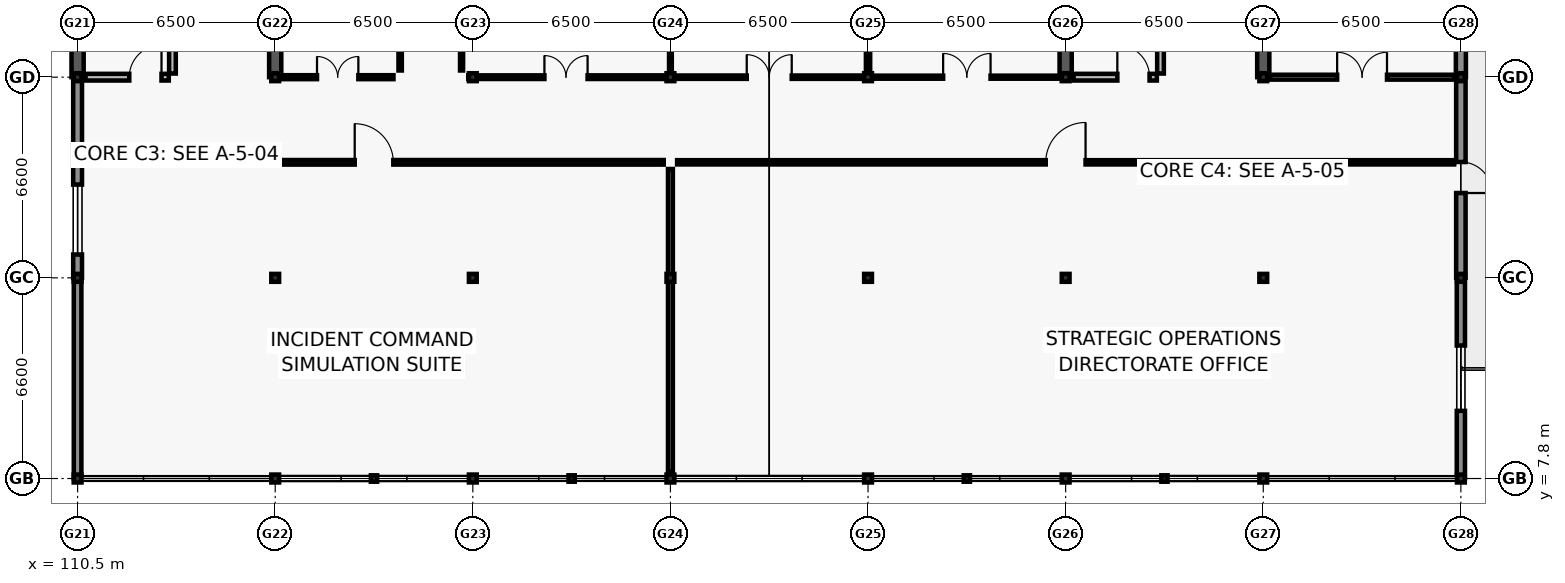
"""IFC4 building model, lengths in metres.
Left out: names, types, materials, properties, quantities, classifications, styles, units other than length and angle.
Written with IfcOpenShell. Run it as: python <this file> out.ifc"""

import sys

from ifc_helpers import new_model, si_unit, direction, frame, frame_2d, origin, origin_2d, place, context, subcontext, project, spatial, rectangle, i_section, extrude, element, fill, save


model = new_model("IFC4")
c1 = context("Model", 3, precision=1e-05, world=origin(), true_north=direction((0.0, 1.0)))
c2 = subcontext(c1, "Body", "Model", "MODEL_VIEW")
j1 = project(units=[si_unit("LENGTHUNIT", "METRE"), si_unit("PLANEANGLEUNIT", "RADIAN")], contexts=[c1])
p1 = place(None, origin())
s1 = spatial("IfcSite", under=j1, at=p1, CompositionType="ELEMENT")
p2 = place(p1, origin())
s2 = spatial("IfcBuilding", under=s1, at=p2, CompositionType="ELEMENT")
p3 = place(p2, frame((0.0, 0.0, 17.4)))
s3 = spatial("IfcBuildingStorey", under=s2, at=p3, CompositionType="ELEMENT", Elevation=17.4)
for number, where, z_axis, x_axis in (
    (1, (110.5, 7.8, 0.0), (0.0, 0.0, 1.0), (1.0, 0.0, 0.0)),
    (2, (110.5, 14.4, 0.0), (0.0, 0.0, 1.0), (1.0, 0.0, 0.0)),
    (3, (110.5, 21.0, 0.0), (0.0, 0.0, 1.0), (1.0, 0.0, 0.0)),
    (4, (117.0, 7.8, 0.0), (0.0, 0.0, 1.0), (1.0, 0.0, 0.0)),
    (5, (117.0, 14.4, 0.0), (0.0, 0.0, 1.0), (1.0, 0.0, 0.0)),
    (6, (117.0, 21.0, 0.0), (0.0, 0.0, 1.0), (1.0, 0.0, 0.0)),
    (7, (123.5, 7.8, 0.0), (0.0, 0.0, 1.0), (1.0, 0.0, 0.0)),
    (8, (123.5, 14.4, 0.0), (0.0, 0.0, 1.0), (1.0, 0.0, 0.0)),
    (9, (123.5, 21.0, 0.0), (0.0, 0.0, 1.0), (1.0, 0.0, 0.0)),
    (10, (130.0, 7.8, 0.0), (0.0, 0.0, 1.0), (1.0, 0.0, 0.0)),
    (11, (130.0, 14.4, 0.0), (0.0, 0.0, 1.0), (1.0, 0.0, 0.0)),
    (12, (130.0, 21.0, 0.0), (0.0, 0.0, 1.0), (1.0, 0.0, 0.0)),
    (13, (136.5, 7.8, 0.0), (0.0, 0.0, 1.0), (1.0, 0.0, 0.0)),
    (14, (136.5, 14.4, 0.0), (0.0, 0.0, 1.0), (1.0, 0.0, 0.0)),
    (15, (136.5, 21.0, 0.0), (0.0, 0.0, 1.0), (1.0, 0.0, 0.0)),
    (16, (143.0, 7.8, 0.0), (0.0, 0.0, 1.0), (1.0, 0.0, 0.0)),
    (17, (143.0, 14.4, 0.0), (0.0, 0.0, 1.0), (1.0, 0.0, 0.0)),
    (18, (143.0, 21.0, 0.0), (0.0, 0.0, 1.0), (1.0, 0.0, 0.0)),
    (19, (149.5, 7.8, 0.0), (0.0, 0.0, 1.0), (1.0, 0.0, 0.0)),
    (20, (149.5, 14.4, 0.0), (0.0, 0.0, 1.0), (1.0, 0.0, 0.0)),
    (21, (149.5, 21.0, 0.0), (0.0, 0.0, 1.0), (1.0, 0.0, 0.0)),
    (22, (156.0, 7.8, 0.0), (0.0, 0.0, 1.0), (1.0, 0.0, 0.0)),
    (23, (156.0, 14.4, 0.0), (0.0, 0.0, 1.0), (1.0, 0.0, 0.0)),
    (24, (156.0, 21.0, 0.0), (0.0, 0.0, 1.0), (1.0, 0.0, 0.0)),
):
    element("IfcColumn", number, at=place(p3, frame(where, z_axis=z_axis, x_axis=x_axis)), inside=s3, PredefinedType="COLUMN", context=c2, shape_type="SweptSolid", body=[
        extrude(i_section(OverallWidth=0.256, OverallDepth=0.26, WebThickness=0.01, FlangeThickness=0.017, FilletRadius=0.013, at=origin_2d()), origin(), (0.0, 0.0, 1.0), 3.9),
    ])
for number, where, z_axis, x_axis in (
    (25, (120.25, 7.8, 0.0), (0.0, 0.0, 1.0), (1.0, 0.0, 0.0)),
    (26, (126.75, 7.8, 0.0), (0.0, 0.0, 1.0), (1.0, 0.0, 0.0)),
    (27, (139.75, 7.8, 0.0), (0.0, 0.0, 1.0), (1.0, 0.0, 0.0)),
    (28, (146.25, 7.8, 0.0), (0.0, 0.0, 1.0), (1.0, 0.0, 0.0)),
):
    element("IfcColumn", number, at=place(p3, frame(where, z_axis=z_axis, x_axis=x_axis)), inside=s3, PredefinedType="PILASTER", context=c2, shape_type="SweptSolid", body=[
        extrude(i_section(OverallWidth=0.205, OverallDepth=0.21, WebThickness=0.009, FlangeThickness=0.014, FilletRadius=0.011, at=origin_2d()), origin(), (0.0, 0.0, 1.0), 3.9),
    ])
for number, where, z_axis, x_axis in (
    (29, (110.5, 21.0, 0.0), (0.0, 0.0, 1.0), (0.0, 1.0, 0.0)),
    (30, (117.0, 21.0, 0.0), (0.0, 0.0, 1.0), (0.0, 1.0, 0.0)),
    (31, (143.0, 21.0, 0.0), (0.0, 0.0, 1.0), (0.0, 1.0, 0.0)),
    (32, (149.5, 21.0, 0.0), (0.0, 0.0, 1.0), (0.0, 1.0, 0.0)),
):
    element("IfcWall", number, at=place(p3, frame(where, z_axis=z_axis, x_axis=x_axis)), inside=s3, PredefinedType="SHEAR", context=c2, shape_type="SweptSolid", body=[
        extrude(rectangle(XDim=6.4, YDim=0.4, at=frame_2d((3.2, 0.0))), origin(), (0.0, 0.0, 1.0), 3.66),
    ])
p4 = place(p3, frame((110.5, 7.805, 0.0), z_axis=(0.0, 0.0, 1.0), x_axis=(0.0, 1.0, 0.0)))
e33 = element("IfcWall", 33, at=p4, inside=s3, PredefinedType="SOLIDWALL", context=c2, shape_type="SweptSolid", body=[
    extrude(rectangle(XDim=6.59, YDim=0.25, at=frame_2d((3.295, 0.0))), origin(), (0.0, 0.0, 1.0), 3.02),
])
p5 = place(p3, frame((156.0, 14.395, 0.0), z_axis=(0.0, 0.0, 1.0), x_axis=(0.0, -1.0, 0.0)))
e34 = element("IfcWall", 34, at=p5, inside=s3, PredefinedType="SOLIDWALL", context=c2, shape_type="SweptSolid", body=[
    extrude(rectangle(XDim=6.59, YDim=0.27, at=frame_2d((3.295, 0.0))), origin(), (0.0, 0.0, 1.0), 3.02),
])
p6 = place(p5, frame((2.22, 0.0, 0.8)))
e35 = element("IfcOpeningElement", 35, at=p6, cuts=e34, PredefinedType="OPENING", context=c2, shape_type="SweptSolid", body=[
    extrude(rectangle(XDim=2.15, YDim=1.55, at=frame_2d((1.075, 0.775))), frame((0.0, 0.145, 0.0), z_axis=(0.0, -1.0, 0.0), x_axis=(1.0, 0.0, 0.0)), (0.0, 0.0, 1.0), 0.29),
])
p7 = place(p3, frame((110.5, 14.405, 0.0), z_axis=(0.0, 0.0, 1.0), x_axis=(0.0, 1.0, 0.0)))
e36 = element("IfcWall", 36, at=p7, inside=s3, PredefinedType="SOLIDWALL", context=c2, shape_type="SweptSolid", body=[
    extrude(rectangle(XDim=6.59, YDim=0.29, at=frame_2d((3.295, 0.0))), origin(), (0.0, 0.0, 1.0), 3.02),
])
p8 = place(p7, frame((0.762, 0.0, 0.8)))
e37 = element("IfcOpeningElement", 37, at=p8, cuts=e36, PredefinedType="OPENING", context=c2, shape_type="SweptSolid", body=[
    extrude(rectangle(XDim=2.3, YDim=1.55, at=frame_2d((1.15, 0.775))), frame((0.0, 0.155, 0.0), z_axis=(0.0, -1.0, 0.0), x_axis=(1.0, 0.0, 0.0)), (0.0, 0.0, 1.0), 0.31),
])
p9 = place(p3, frame((156.0, 20.995, 0.0), z_axis=(0.0, 0.0, 1.0), x_axis=(0.0, -1.0, 0.0)))
e38 = element("IfcWall", 38, at=p9, inside=s3, PredefinedType="SOLIDWALL", context=c2, shape_type="SweptSolid", body=[
    extrude(rectangle(XDim=6.59, YDim=0.31, at=frame_2d((3.295, 0.0))), origin(), (0.0, 0.0, 1.0), 3.02),
])
p10 = place(p9, frame((2.785, 0.0, 0.0)))
e39 = element("IfcOpeningElement", 39, at=p10, cuts=e38, PredefinedType="OPENING", context=c2, shape_type="SweptSolid", body=[
    extrude(rectangle(XDim=1.02, YDim=2.14, at=frame_2d((0.51, 1.07))), frame((0.0, 0.165, 0.0), z_axis=(0.0, -1.0, 0.0), x_axis=(1.0, 0.0, 0.0)), (0.0, 0.0, 1.0), 0.33),
])
p11 = place(p3, frame((156.0, 27.595, 0.0), z_axis=(0.0, 0.0, 1.0), x_axis=(0.0, -1.0, 0.0)))
e40 = element("IfcWall", 40, at=p11, inside=s3, PredefinedType="SOLIDWALL", context=c2, shape_type="SweptSolid", body=[
    extrude(rectangle(XDim=6.59, YDim=0.33, at=frame_2d((3.295, 0.0))), origin(), (0.0, 0.0, 1.0), 3.02),
])
p12 = place(p11, frame((2.445, 0.0, 0.8)))
e41 = element("IfcOpeningElement", 41, at=p12, cuts=e40, PredefinedType="OPENING", context=c2, shape_type="SweptSolid", body=[
    extrude(rectangle(XDim=1.7, YDim=1.95, at=frame_2d((0.85, 0.975))), frame((0.0, 0.175, 0.0), z_axis=(0.0, -1.0, 0.0), x_axis=(1.0, 0.0, 0.0)), (0.0, 0.0, 1.0), 0.35),
])
p13 = place(p3, frame((113.62, 21.12, 0.0), z_axis=(0.0, 0.0, 1.0), x_axis=(0.0, 1.0, 0.0)))
e42 = element("IfcWall", 42, at=p13, inside=s3, PredefinedType="SOLIDWALL", context=c2, shape_type="SweptSolid", body=[
    extrude(rectangle(XDim=6.255, YDim=0.22, at=frame_2d((3.127, 0.0))), origin(), (0.0, 0.0, 1.0), 3.66),
])
p14 = place(p3, frame((110.76, 21.0, 0.0), z_axis=(0.0, 0.0, 1.0), x_axis=(1.0, 0.0, 0.0)))
e43 = element("IfcWall", 43, at=p14, inside=s3, PredefinedType="SOLIDWALL", context=c2, shape_type="SweptSolid", body=[
    extrude(rectangle(XDim=2.74, YDim=0.22, at=frame_2d((1.37, 0.0))), origin(), (0.0, 0.0, 1.0), 3.02),
])
p15 = place(p14, frame((1.44, 0.0, 0.0)))
e44 = element("IfcOpeningElement", 44, at=p15, cuts=e43, PredefinedType="OPENING", context=c2, shape_type="SweptSolid", body=[
    extrude(rectangle(XDim=1.06, YDim=2.1, at=frame_2d((0.53, 1.05))), frame((0.0, 0.12, 0.0), z_axis=(0.0, -1.0, 0.0), x_axis=(1.0, 0.0, 0.0)), (0.0, 0.0, 1.0), 0.24),
])
p16 = place(p3, frame((146.12, 21.12, 0.0), z_axis=(0.0, 0.0, 1.0), x_axis=(0.0, 1.0, 0.0)))
e45 = element("IfcWall", 45, at=p16, inside=s3, PredefinedType="SOLIDWALL", context=c2, shape_type="SweptSolid", body=[
    extrude(rectangle(XDim=6.255, YDim=0.22, at=frame_2d((3.127, 0.0))), origin(), (0.0, 0.0, 1.0), 3.66),
])
p17 = place(p3, frame((143.26, 21.0, 0.0), z_axis=(0.0, 0.0, 1.0), x_axis=(1.0, 0.0, 0.0)))
e46 = element("IfcWall", 46, at=p17, inside=s3, PredefinedType="SOLIDWALL", context=c2, shape_type="SweptSolid", body=[
    extrude(rectangle(XDim=2.74, YDim=0.22, at=frame_2d((1.37, 0.0))), origin(), (0.0, 0.0, 1.0), 3.02),
])
p18 = place(p17, frame((1.44, 0.0, 0.0)))
e47 = element("IfcOpeningElement", 47, at=p18, cuts=e46, PredefinedType="OPENING", context=c2, shape_type="SweptSolid", body=[
    extrude(rectangle(XDim=1.06, YDim=2.1, at=frame_2d((0.53, 1.05))), frame((0.0, 0.12, 0.0), z_axis=(0.0, -1.0, 0.0), x_axis=(1.0, 0.0, 0.0)), (0.0, 0.0, 1.0), 0.24),
])
p19 = place(p3, frame((121.11, 21.22, 0.0), z_axis=(0.0, 0.0, 1.0), x_axis=(0.0, 1.0, 0.0)))
e48 = element("IfcWall", 48, at=p19, inside=s3, PredefinedType="PARTITIONING", context=c2, shape_type="SweptSolid", body=[
    extrude(rectangle(XDim=2.76, YDim=0.11, at=frame_2d((1.38, 0.0))), origin(), (0.0, 0.0, 1.0), 3.0),
])
p20 = place(p19, frame((0.785, 0.0, 0.0)))
e49 = element("IfcOpeningElement", 49, at=p20, cuts=e48, PredefinedType="OPENING", context=c2, shape_type="SweptSolid", body=[
    extrude(rectangle(XDim=1.19, YDim=2.14, at=frame_2d((0.595, 1.07))), frame((0.0, 0.065, 0.0), z_axis=(0.0, -1.0, 0.0), x_axis=(1.0, 0.0, 0.0)), (0.0, 0.0, 1.0), 0.13),
])
p21 = place(p3, frame((123.13, 21.22, 0.0), z_axis=(0.0, 0.0, 1.0), x_axis=(0.0, 1.0, 0.0)))
e50 = element("IfcWall", 50, at=p21, inside=s3, PredefinedType="PARTITIONING", context=c2, shape_type="SweptSolid", body=[
    extrude(rectangle(XDim=2.76, YDim=0.1, at=frame_2d((1.38, 0.0))), origin(), (0.0, 0.0, 1.0), 3.0),
])
p22 = place(p21, frame((0.765, 0.0, 0.0)))
e51 = element("IfcOpeningElement", 51, at=p22, cuts=e50, PredefinedType="OPENING", context=c2, shape_type="SweptSolid", body=[
    extrude(rectangle(XDim=1.23, YDim=2.08, at=frame_2d((0.615, 1.04))), frame((0.0, 0.06, 0.0), z_axis=(0.0, -1.0, 0.0), x_axis=(1.0, 0.0, 0.0)), (0.0, 0.0, 1.0), 0.12),
])
p23 = place(p3, frame((130.0, 8.02, 0.0), z_axis=(0.0, 0.0, 1.0), x_axis=(0.0, 1.0, 0.0)))
e52 = element("IfcWall", 52, at=p23, inside=s3, PredefinedType="PARTITIONING", context=c2, shape_type="SweptSolid", body=[
    extrude(rectangle(XDim=9.96, YDim=0.16, at=frame_2d((4.98, 0.0))), origin(), (0.0, 0.0, 1.0), 3.0),
])
p24 = place(p3, frame((110.72, 18.2, 0.0), z_axis=(0.0, 0.0, 1.0), x_axis=(1.0, 0.0, 0.0)))
e53 = element("IfcWall", 53, at=p24, inside=s3, PredefinedType="PARTITIONING", context=c2, shape_type="SweptSolid", body=[
    extrude(rectangle(XDim=19.06, YDim=0.15, at=frame_2d((9.53, 0.0))), origin(), (0.0, 0.0, 1.0), 3.0),
])
p25 = place(p24, frame((8.895, 0.0, 0.0)))
e54 = element("IfcOpeningElement", 54, at=p25, cuts=e53, PredefinedType="OPENING", context=c2, shape_type="SweptSolid", body=[
    extrude(rectangle(XDim=1.27, YDim=2.1, at=frame_2d((0.635, 1.05))), frame((0.0, 0.085, 0.0), z_axis=(0.0, -1.0, 0.0), x_axis=(1.0, 0.0, 0.0)), (0.0, 0.0, 1.0), 0.17),
])
p26 = place(p3, frame((130.22, 18.2, 0.0), z_axis=(0.0, 0.0, 1.0), x_axis=(1.0, 0.0, 0.0)))
e55 = element("IfcWall", 55, at=p26, inside=s3, PredefinedType="PARTITIONING", context=c2, shape_type="SweptSolid", body=[
    extrude(rectangle(XDim=25.56, YDim=0.14, at=frame_2d((12.78, 0.0))), origin(), (0.0, 0.0, 1.0), 3.0),
])
p27 = place(p26, frame((12.125, 0.0, 0.0)))
e56 = element("IfcOpeningElement", 56, at=p27, cuts=e55, PredefinedType="OPENING", context=c2, shape_type="SweptSolid", body=[
    extrude(rectangle(XDim=1.31, YDim=2.14, at=frame_2d((0.655, 1.07))), frame((0.0, 0.08, 0.0), z_axis=(0.0, -1.0, 0.0), x_axis=(1.0, 0.0, 0.0)), (0.0, 0.0, 1.0), 0.16),
])
p28 = place(p3, frame((117.22, 21.0, 0.0), z_axis=(0.0, 0.0, 1.0), x_axis=(1.0, 0.0, 0.0)))
e57 = element("IfcWall", 57, at=p28, inside=s3, PredefinedType="PARTITIONING", context=c2, shape_type="SweptSolid", body=[
    extrude(rectangle(XDim=3.67, YDim=0.13, at=frame_2d((1.835, 0.0))), origin(), (0.0, 0.0, 1.0), 3.0),
])
p29 = place(p28, frame((1.155, 0.0, 0.0)))
e58 = element("IfcOpeningElement", 58, at=p29, cuts=e57, PredefinedType="OPENING", context=c2, shape_type="SweptSolid", body=[
    extrude(rectangle(XDim=1.36, YDim=2.15, at=frame_2d((0.68, 1.075))), frame((0.0, 0.075, 0.0), z_axis=(0.0, -1.0, 0.0), x_axis=(1.0, 0.0, 0.0)), (0.0, 0.0, 1.0), 0.15),
])
p30 = place(p3, frame((123.35, 21.0, 0.0), z_axis=(0.0, 0.0, 1.0), x_axis=(1.0, 0.0, 0.0)))
e59 = element("IfcWall", 59, at=p30, inside=s3, PredefinedType="PARTITIONING", context=c2, shape_type="SweptSolid", body=[
    extrude(rectangle(XDim=6.43, YDim=0.12, at=frame_2d((3.215, 0.0))), origin(), (0.0, 0.0, 1.0), 3.0),
])
p31 = place(p30, frame((2.505, 0.0, 0.0)))
e60 = element("IfcOpeningElement", 60, at=p31, cuts=e59, PredefinedType="OPENING", context=c2, shape_type="SweptSolid", body=[
    extrude(rectangle(XDim=1.42, YDim=2.15, at=frame_2d((0.71, 1.075))), frame((0.0, 0.07, 0.0), z_axis=(0.0, -1.0, 0.0), x_axis=(1.0, 0.0, 0.0)), (0.0, 0.0, 1.0), 0.14),
])
p32 = place(p3, frame((130.22, 21.0, 0.0), z_axis=(0.0, 0.0, 1.0), x_axis=(1.0, 0.0, 0.0)))
e61 = element("IfcWall", 61, at=p32, inside=s3, PredefinedType="PARTITIONING", context=c2, shape_type="SweptSolid", body=[
    extrude(rectangle(XDim=6.06, YDim=0.11, at=frame_2d((3.03, 0.0))), origin(), (0.0, 0.0, 1.0), 3.0),
])
p33 = place(p32, frame((2.29, 0.0, 0.0)))
e62 = element("IfcOpeningElement", 62, at=p33, cuts=e61, PredefinedType="OPENING", context=c2, shape_type="SweptSolid", body=[
    extrude(rectangle(XDim=1.48, YDim=2.18, at=frame_2d((0.74, 1.09))), frame((0.0, 0.065, 0.0), z_axis=(0.0, -1.0, 0.0), x_axis=(1.0, 0.0, 0.0)), (0.0, 0.0, 1.0), 0.13),
])
p34 = place(p3, frame((136.72, 21.0, 0.0), z_axis=(0.0, 0.0, 1.0), x_axis=(1.0, 0.0, 0.0)))
e63 = element("IfcWall", 63, at=p34, inside=s3, PredefinedType="PARTITIONING", context=c2, shape_type="SweptSolid", body=[
    extrude(rectangle(XDim=6.06, YDim=0.1, at=frame_2d((3.03, 0.0))), origin(), (0.0, 0.0, 1.0), 3.0),
])
p35 = place(p34, frame((2.25, 0.0, 0.0)))
e64 = element("IfcOpeningElement", 64, at=p35, cuts=e63, PredefinedType="OPENING", context=c2, shape_type="SweptSolid", body=[
    extrude(rectangle(XDim=1.56, YDim=2.18, at=frame_2d((0.78, 1.09))), frame((0.0, 0.06, 0.0), z_axis=(0.0, -1.0, 0.0), x_axis=(1.0, 0.0, 0.0)), (0.0, 0.0, 1.0), 0.12),
])
p36 = place(p3, frame((149.72, 21.0, 0.0), z_axis=(0.0, 0.0, 1.0), x_axis=(1.0, 0.0, 0.0)))
e65 = element("IfcWall", 65, at=p36, inside=s3, PredefinedType="PARTITIONING", context=c2, shape_type="SweptSolid", body=[
    extrude(rectangle(XDim=6.06, YDim=0.16, at=frame_2d((3.03, 0.0))), origin(), (0.0, 0.0, 1.0), 3.0),
])
p37 = place(p36, frame((2.21, 0.0, 0.0)))
e66 = element("IfcOpeningElement", 66, at=p37, cuts=e65, PredefinedType="OPENING", context=c2, shape_type="SweptSolid", body=[
    extrude(rectangle(XDim=1.64, YDim=2.2, at=frame_2d((0.82, 1.1))), frame((0.0, 0.09, 0.0), z_axis=(0.0, -1.0, 0.0), x_axis=(1.0, 0.0, 0.0)), (0.0, 0.0, 1.0), 0.18),
])
p38 = place(p3, frame((130.0, 21.22, 0.0), z_axis=(0.0, 0.0, 1.0), x_axis=(0.0, 1.0, 0.0)))
e67 = element("IfcWall", 67, at=p38, inside=s3, PredefinedType="MOVABLE", context=c2, shape_type="SweptSolid", body=[
    extrude(rectangle(XDim=6.16, YDim=0.09, at=frame_2d((3.08, 0.0))), origin(), (0.0, 0.0, 1.0), 3.0),
])
p39 = place(p3, frame((136.5, 21.22, 0.0), z_axis=(0.0, 0.0, 1.0), x_axis=(0.0, 1.0, 0.0)))
e68 = element("IfcWall", 68, at=p39, inside=s3, PredefinedType="PARTITIONING", context=c2, shape_type="SweptSolid", body=[
    extrude(rectangle(XDim=6.16, YDim=0.14, at=frame_2d((3.08, 0.0))), origin(), (0.0, 0.0, 1.0), 3.0),
])
p40 = place(p6, origin())
e69 = element("IfcWindow", 69, at=p40, inside=s3, PartitioningType="DOUBLE_PANEL_VERTICAL", PredefinedType="WINDOW", context=c2, shape_type="SweptSolid", body=[
    extrude(rectangle(XDim=2.15, YDim=1.55, at=frame_2d((1.075, 0.775))), frame((0.0, 0.03, 0.0), z_axis=(0.0, -1.0, 0.0), x_axis=(1.0, 0.0, 0.0)), (0.0, 0.0, 1.0), 0.06),
])
fill(e35, e69)
p41 = place(p8, origin())
e70 = element("IfcWindow", 70, at=p41, inside=s3, PartitioningType="DOUBLE_PANEL_VERTICAL", PredefinedType="WINDOW", context=c2, shape_type="SweptSolid", body=[
    extrude(rectangle(XDim=2.3, YDim=1.55, at=frame_2d((1.15, 0.775))), frame((0.0, 0.03, 0.0), z_axis=(0.0, -1.0, 0.0), x_axis=(1.0, 0.0, 0.0)), (0.0, 0.0, 1.0), 0.06),
])
fill(e37, e70)
p42 = place(p10, origin())
e71 = element("IfcDoor", 71, at=p42, inside=s3, OperationType="SINGLE_SWING_RIGHT", PredefinedType="DOOR", context=c2, shape_type="SweptSolid", body=[
    extrude(rectangle(XDim=1.02, YDim=2.14, at=frame_2d((0.51, 1.07))), frame((0.0, 0.025, 0.0), z_axis=(0.0, -1.0, 0.0), x_axis=(1.0, 0.0, 0.0)), (0.0, 0.0, 1.0), 0.05),
])
fill(e39, e71)
p43 = place(p15, origin())
e72 = element("IfcDoor", 72, at=p43, inside=s3, OperationType="SINGLE_SWING_RIGHT", PredefinedType="DOOR", context=c2, shape_type="SweptSolid", body=[
    extrude(rectangle(XDim=1.06, YDim=2.1, at=frame_2d((0.53, 1.05))), frame((0.0, 0.025, 0.0), z_axis=(0.0, -1.0, 0.0), x_axis=(1.0, 0.0, 0.0)), (0.0, 0.0, 1.0), 0.05),
])
fill(e44, e72)
p44 = place(p18, origin())
e73 = element("IfcDoor", 73, at=p44, inside=s3, OperationType="SINGLE_SWING_LEFT", PredefinedType="DOOR", context=c2, shape_type="SweptSolid", body=[
    extrude(rectangle(XDim=1.06, YDim=2.1, at=frame_2d((0.53, 1.05))), frame((0.0, 0.025, 0.0), z_axis=(0.0, -1.0, 0.0), x_axis=(1.0, 0.0, 0.0)), (0.0, 0.0, 1.0), 0.05),
])
fill(e47, e73)
p45 = place(p25, origin())
e74 = element("IfcDoor", 74, at=p45, inside=s3, OperationType="SINGLE_SWING_LEFT", PredefinedType="DOOR", context=c2, shape_type="SweptSolid", body=[
    extrude(rectangle(XDim=1.27, YDim=2.1, at=frame_2d((0.635, 1.05))), frame((0.0, 0.025, 0.0), z_axis=(0.0, -1.0, 0.0), x_axis=(1.0, 0.0, 0.0)), (0.0, 0.0, 1.0), 0.05),
])
fill(e54, e74)
p46 = place(p27, origin())
e75 = element("IfcDoor", 75, at=p46, inside=s3, OperationType="SINGLE_SWING_RIGHT", PredefinedType="DOOR", context=c2, shape_type="SweptSolid", body=[
    extrude(rectangle(XDim=1.31, YDim=2.14, at=frame_2d((0.655, 1.07))), frame((0.0, 0.025, 0.0), z_axis=(0.0, -1.0, 0.0), x_axis=(1.0, 0.0, 0.0)), (0.0, 0.0, 1.0), 0.05),
])
fill(e56, e75)
p47 = place(p29, origin())
e76 = element("IfcDoor", 76, at=p47, inside=s3, OperationType="DOUBLE_DOOR_SINGLE_SWING", PredefinedType="DOOR", context=c2, shape_type="SweptSolid", body=[
    extrude(rectangle(XDim=1.36, YDim=2.15, at=frame_2d((0.68, 1.075))), frame((0.0, 0.025, 0.0), z_axis=(0.0, -1.0, 0.0), x_axis=(1.0, 0.0, 0.0)), (0.0, 0.0, 1.0), 0.05),
])
fill(e58, e76)
p48 = place(p31, origin())
e77 = element("IfcDoor", 77, at=p48, inside=s3, OperationType="DOUBLE_DOOR_SINGLE_SWING", PredefinedType="DOOR", context=c2, shape_type="SweptSolid", body=[
    extrude(rectangle(XDim=1.42, YDim=2.15, at=frame_2d((0.71, 1.075))), frame((0.0, 0.025, 0.0), z_axis=(0.0, -1.0, 0.0), x_axis=(1.0, 0.0, 0.0)), (0.0, 0.0, 1.0), 0.05),
])
fill(e60, e77)
p49 = place(p33, origin())
e78 = element("IfcDoor", 78, at=p49, inside=s3, OperationType="DOUBLE_DOOR_SINGLE_SWING", PredefinedType="DOOR", context=c2, shape_type="SweptSolid", body=[
    extrude(rectangle(XDim=1.48, YDim=2.18, at=frame_2d((0.74, 1.09))), frame((0.0, 0.025, 0.0), z_axis=(0.0, -1.0, 0.0), x_axis=(1.0, 0.0, 0.0)), (0.0, 0.0, 1.0), 0.05),
])
fill(e62, e78)
p50 = place(p35, origin())
e79 = element("IfcDoor", 79, at=p50, inside=s3, OperationType="DOUBLE_DOOR_SINGLE_SWING", PredefinedType="DOOR", context=c2, shape_type="SweptSolid", body=[
    extrude(rectangle(XDim=1.56, YDim=2.18, at=frame_2d((0.78, 1.09))), frame((0.0, 0.025, 0.0), z_axis=(0.0, -1.0, 0.0), x_axis=(1.0, 0.0, 0.0)), (0.0, 0.0, 1.0), 0.05),
])
fill(e64, e79)
p51 = place(p37, origin())
e80 = element("IfcDoor", 80, at=p51, inside=s3, OperationType="DOUBLE_DOOR_SINGLE_SWING", PredefinedType="DOOR", context=c2, shape_type="SweptSolid", body=[
    extrude(rectangle(XDim=1.64, YDim=2.2, at=frame_2d((0.82, 1.1))), frame((0.0, 0.025, 0.0), z_axis=(0.0, -1.0, 0.0), x_axis=(1.0, 0.0, 0.0)), (0.0, 0.0, 1.0), 0.05),
])
fill(e66, e80)
save(model, sys.argv[1])
